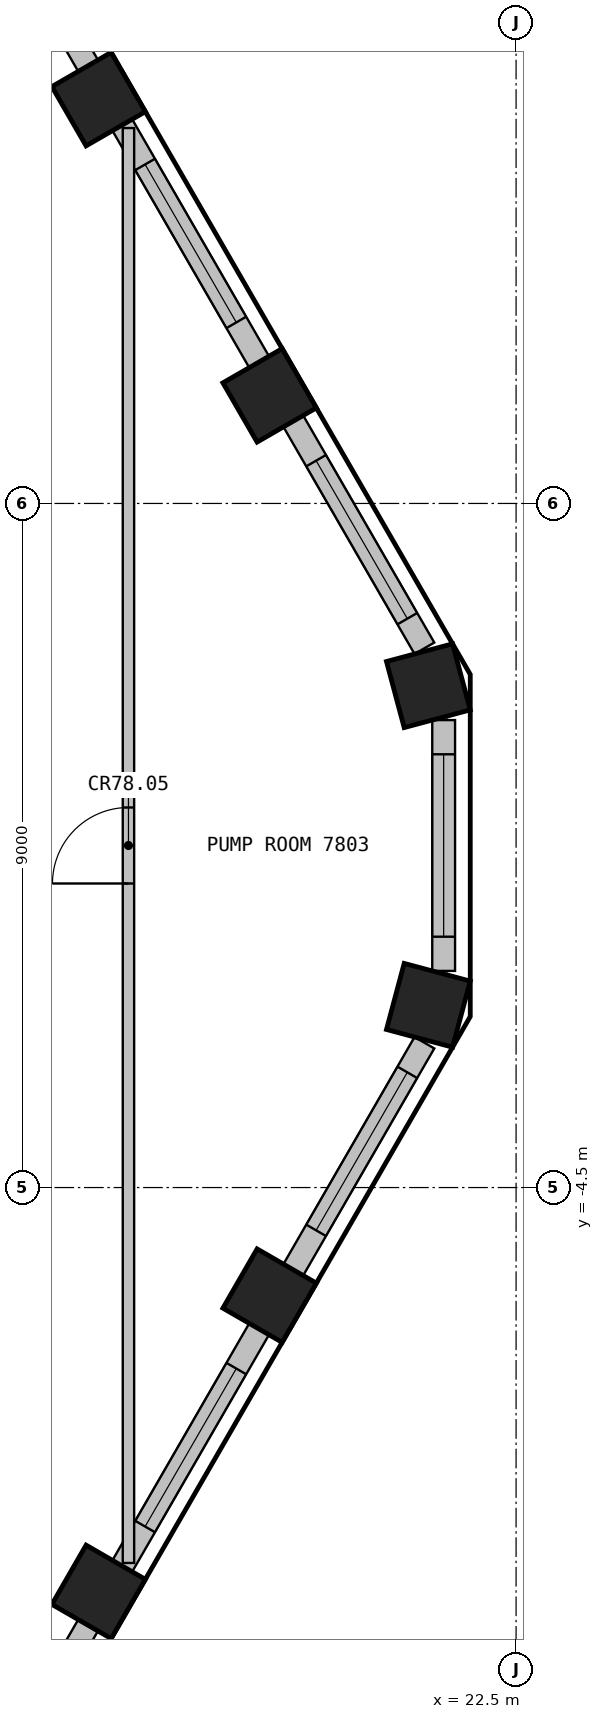
"""IFC4 building model, lengths in metres.
Left out: names, types, materials, properties, quantities, classifications, styles, units other than length and angle.
Written with IfcOpenShell. Run it as: python <this file> out.ifc"""

import sys

from ifc_helpers import new_model, si_unit, direction, frame, frame_2d, origin, origin_2d, place, context, subcontext, project, spatial, rectangle, extrude, element, fill, save


model = new_model("IFC4")
c1 = context("Model", 3, precision=1e-05, world=origin(), true_north=direction((0.0, 1.0)))
c2 = subcontext(c1, "Body", "Model", "MODEL_VIEW")
j1 = project(units=[si_unit("LENGTHUNIT", "METRE"), si_unit("PLANEANGLEUNIT", "RADIAN")], contexts=[c1])
p1 = place(None, origin())
s1 = spatial("IfcSite", under=j1, at=p1, CompositionType="ELEMENT")
p2 = place(p1, origin())
s2 = spatial("IfcBuilding", under=s1, at=p2, CompositionType="ELEMENT")
p3 = place(p2, frame((0.0, 0.0, 318.9)))
s3 = spatial("IfcBuildingStorey", under=s2, at=p3, CompositionType="ELEMENT", Elevation=318.9)
for number, where, z_axis, x_axis in (
    (1, (17.007, -9.819, 0.0), (0.0, 0.0, 1.0), (0.5, 0.866, 0.0)),
    (2, (19.257, -5.922, 0.0), (0.0, 0.0, 1.0), (0.5, 0.866, 0.0)),
    (3, (21.346, -2.102, 0.0), (0.0, 0.0, 1.0), (0.259, 0.966, 0.0)),
    (4, (21.346, 2.102, 0.0), (0.0, 0.0, 1.0), (-0.259, 0.966, 0.0)),
    (5, (19.257, 5.922, 0.0), (0.0, 0.0, 1.0), (-0.5, 0.866, 0.0)),
    (6, (17.007, 9.819, 0.0), (0.0, 0.0, 1.0), (-0.5, 0.866, 0.0)),
):
    element("IfcColumn", number, at=place(p3, frame(where, z_axis=z_axis, x_axis=x_axis)), inside=s3, PredefinedType="COLUMN", context=c2, shape_type="SweptSolid", body=[
        extrude(rectangle(XDim=0.9, YDim=0.9, at=origin_2d()), origin(), (0.0, 0.0, 1.0), 3.6),
    ])
p4 = place(p3, frame((15.144, -13.247, 0.0), z_axis=(0.0, 0.0, 1.0), x_axis=(0.500059425018, 0.865991092016, 0.0)))
e7 = element("IfcWall", 7, at=p4, inside=s3, PredefinedType="SOLIDWALL", context=c2, shape_type="SweptSolid", body=[
    extrude(rectangle(XDim=3.449, YDim=0.3, at=frame_2d((1.725, 0.0))), origin(), (0.0, 0.0, 1.0), 4.05),
])
p5 = place(p4, frame((0.45, 0.0, 0.6)))
e8 = element("IfcOpeningElement", 8, at=p5, cuts=e7, PredefinedType="OPENING", context=c2, shape_type="SweptSolid", body=[
    extrude(rectangle(XDim=2.4, YDim=2.3, at=frame_2d((1.2, 1.15))), frame((0.0, 0.16, 0.0), z_axis=(0.0, -1.0, 0.0), x_axis=(1.0, 0.0, 0.0)), (0.0, 0.0, 1.0), 0.32),
])
p6 = place(p3, frame((17.319, -9.479, 0.0), z_axis=(0.0, 0.0, 1.0), x_axis=(0.500027802648, 0.866009351323, 0.0)))
e9 = element("IfcWall", 9, at=p6, inside=s3, PredefinedType="SOLIDWALL", context=c2, shape_type="SweptSolid", body=[
    extrude(rectangle(XDim=3.599, YDim=0.3, at=frame_2d((1.799, 0.0))), origin(), (0.0, 0.0, 1.0), 4.05),
])
p7 = place(p6, frame((0.6, 0.0, 0.6)))
e10 = element("IfcOpeningElement", 10, at=p7, cuts=e9, PredefinedType="OPENING", context=c2, shape_type="SweptSolid", body=[
    extrude(rectangle(XDim=2.4, YDim=2.3, at=frame_2d((1.2, 1.15))), frame((0.0, 0.16, 0.0), z_axis=(0.0, -1.0, 0.0), x_axis=(1.0, 0.0, 0.0)), (0.0, 0.0, 1.0), 0.32),
])
p8 = place(p3, frame((19.569, -5.582, 0.0), z_axis=(0.0, 0.0, 1.0), x_axis=(0.499975693202, 0.866039436866, 0.0)))
e11 = element("IfcWall", 11, at=p8, inside=s3, PredefinedType="SOLIDWALL", context=c2, shape_type="SweptSolid", body=[
    extrude(rectangle(XDim=3.449, YDim=0.3, at=frame_2d((1.725, 0.0))), origin(), (0.0, 0.0, 1.0), 4.05),
])
p9 = place(p8, frame((0.6, 0.0, 0.6)))
e12 = element("IfcOpeningElement", 12, at=p9, cuts=e11, PredefinedType="OPENING", context=c2, shape_type="SweptSolid", body=[
    extrude(rectangle(XDim=2.4, YDim=2.3, at=frame_2d((1.2, 1.15))), frame((0.0, 0.16, 0.0), z_axis=(0.0, -1.0, 0.0), x_axis=(1.0, 0.0, 0.0)), (0.0, 0.0, 1.0), 0.32),
])
p10 = place(p3, frame((21.547, -1.65, 0.0), z_axis=(0.0, 0.0, 1.0), x_axis=(0.0, 1.0, 0.0)))
e13 = element("IfcWall", 13, at=p10, inside=s3, PredefinedType="SOLIDWALL", context=c2, shape_type="SweptSolid", body=[
    extrude(rectangle(XDim=3.3, YDim=0.3, at=frame_2d((1.65, 0.0))), origin(), (0.0, 0.0, 1.0), 4.05),
])
p11 = place(p10, frame((0.45, 0.0, 0.6)))
e14 = element("IfcOpeningElement", 14, at=p11, cuts=e13, PredefinedType="OPENING", context=c2, shape_type="SweptSolid", body=[
    extrude(rectangle(XDim=2.4, YDim=2.3, at=frame_2d((1.2, 1.15))), frame((0.0, 0.16, 0.0), z_axis=(0.0, -1.0, 0.0), x_axis=(1.0, 0.0, 0.0)), (0.0, 0.0, 1.0), 0.32),
])
p12 = place(p3, frame((21.294, 2.595, 0.0), z_axis=(0.0, 0.0, 1.0), x_axis=(-0.499975693202, 0.866039436866, 0.0)))
e15 = element("IfcWall", 15, at=p12, inside=s3, PredefinedType="SOLIDWALL", context=c2, shape_type="SweptSolid", body=[
    extrude(rectangle(XDim=3.449, YDim=0.3, at=frame_2d((1.725, 0.0))), origin(), (0.0, 0.0, 1.0), 4.05),
])
p13 = place(p12, frame((0.45, 0.0, 0.6)))
e16 = element("IfcOpeningElement", 16, at=p13, cuts=e15, PredefinedType="OPENING", context=c2, shape_type="SweptSolid", body=[
    extrude(rectangle(XDim=2.4, YDim=2.3, at=frame_2d((1.2, 1.15))), frame((0.0, 0.16, 0.0), z_axis=(0.0, -1.0, 0.0), x_axis=(1.0, 0.0, 0.0)), (0.0, 0.0, 1.0), 0.32),
])
p14 = place(p3, frame((19.119, 6.362, 0.0), z_axis=(0.0, 0.0, 1.0), x_axis=(-0.500027802648, 0.866009351323, 0.0)))
e17 = element("IfcWall", 17, at=p14, inside=s3, PredefinedType="SOLIDWALL", context=c2, shape_type="SweptSolid", body=[
    extrude(rectangle(XDim=3.599, YDim=0.3, at=frame_2d((1.799, 0.0))), origin(), (0.0, 0.0, 1.0), 4.05),
])
p15 = place(p14, frame((0.6, 0.0, 0.6)))
e18 = element("IfcOpeningElement", 18, at=p15, cuts=e17, PredefinedType="OPENING", context=c2, shape_type="SweptSolid", body=[
    extrude(rectangle(XDim=2.4, YDim=2.3, at=frame_2d((1.2, 1.15))), frame((0.0, 0.16, 0.0), z_axis=(0.0, -1.0, 0.0), x_axis=(1.0, 0.0, 0.0)), (0.0, 0.0, 1.0), 0.32),
])
p16 = place(p3, frame((16.869, 10.26, 0.0), z_axis=(0.0, 0.0, 1.0), x_axis=(-0.500059425018, 0.865991092016, 0.0)))
e19 = element("IfcWall", 19, at=p16, inside=s3, PredefinedType="SOLIDWALL", context=c2, shape_type="SweptSolid", body=[
    extrude(rectangle(XDim=3.449, YDim=0.3, at=frame_2d((1.725, 0.0))), origin(), (0.0, 0.0, 1.0), 4.05),
])
p17 = place(p16, frame((0.6, 0.0, 0.6)))
e20 = element("IfcOpeningElement", 20, at=p17, cuts=e19, PredefinedType="OPENING", context=c2, shape_type="SweptSolid", body=[
    extrude(rectangle(XDim=2.4, YDim=2.3, at=frame_2d((1.2, 1.15))), frame((0.0, 0.16, 0.0), z_axis=(0.0, -1.0, 0.0), x_axis=(1.0, 0.0, 0.0)), (0.0, 0.0, 1.0), 0.32),
])
p18 = place(p3, frame((17.4, -9.439, 0.0), z_axis=(0.0, 0.0, 1.0), x_axis=(0.0, 1.0, 0.0)))
e21 = element("IfcWall", 21, at=p18, inside=s3, PredefinedType="PARTITIONING", context=c2, shape_type="SweptSolid", body=[
    extrude(rectangle(XDim=18.878, YDim=0.15, at=frame_2d((9.439, 0.0))), origin(), (0.0, 0.0, 1.0), 3.6),
])
p19 = place(p18, frame((8.939, 0.0, 0.0)))
e22 = element("IfcOpeningElement", 22, at=p19, cuts=e21, PredefinedType="OPENING", context=c2, shape_type="SweptSolid", body=[
    extrude(rectangle(XDim=1.0, YDim=2.1, at=frame_2d((0.5, 1.05))), frame((0.0, 0.085, 0.0), z_axis=(0.0, -1.0, 0.0), x_axis=(1.0, 0.0, 0.0)), (0.0, 0.0, 1.0), 0.17),
])
p20 = place(p7, origin())
e23 = element("IfcWindow", 23, at=p20, inside=s3, PartitioningType="SINGLE_PANEL", PredefinedType="WINDOW", context=c2, shape_type="SweptSolid", body=[
    extrude(rectangle(XDim=2.4, YDim=2.3, at=frame_2d((1.2, 1.15))), frame((0.0, 0.03, 0.0), z_axis=(0.0, -1.0, 0.0), x_axis=(1.0, 0.0, 0.0)), (0.0, 0.0, 1.0), 0.06),
])
fill(e10, e23)
p21 = place(p9, origin())
e24 = element("IfcWindow", 24, at=p21, inside=s3, PartitioningType="SINGLE_PANEL", PredefinedType="WINDOW", context=c2, shape_type="SweptSolid", body=[
    extrude(rectangle(XDim=2.4, YDim=2.3, at=frame_2d((1.2, 1.15))), frame((0.0, 0.03, 0.0), z_axis=(0.0, -1.0, 0.0), x_axis=(1.0, 0.0, 0.0)), (0.0, 0.0, 1.0), 0.06),
])
fill(e12, e24)
p22 = place(p11, origin())
e25 = element("IfcWindow", 25, at=p22, inside=s3, PartitioningType="SINGLE_PANEL", PredefinedType="WINDOW", context=c2, shape_type="SweptSolid", body=[
    extrude(rectangle(XDim=2.4, YDim=2.3, at=frame_2d((1.2, 1.15))), frame((0.0, 0.03, 0.0), z_axis=(0.0, -1.0, 0.0), x_axis=(1.0, 0.0, 0.0)), (0.0, 0.0, 1.0), 0.06),
])
fill(e14, e25)
p23 = place(p13, origin())
e26 = element("IfcWindow", 26, at=p23, inside=s3, PartitioningType="SINGLE_PANEL", PredefinedType="WINDOW", context=c2, shape_type="SweptSolid", body=[
    extrude(rectangle(XDim=2.4, YDim=2.3, at=frame_2d((1.2, 1.15))), frame((0.0, 0.03, 0.0), z_axis=(0.0, -1.0, 0.0), x_axis=(1.0, 0.0, 0.0)), (0.0, 0.0, 1.0), 0.06),
])
fill(e16, e26)
p24 = place(p15, origin())
e27 = element("IfcWindow", 27, at=p24, inside=s3, PartitioningType="SINGLE_PANEL", PredefinedType="WINDOW", context=c2, shape_type="SweptSolid", body=[
    extrude(rectangle(XDim=2.4, YDim=2.3, at=frame_2d((1.2, 1.15))), frame((0.0, 0.03, 0.0), z_axis=(0.0, -1.0, 0.0), x_axis=(1.0, 0.0, 0.0)), (0.0, 0.0, 1.0), 0.06),
])
fill(e18, e27)
p25 = place(p19, origin())
e28 = element("IfcDoor", 28, at=p25, inside=s3, OperationType="SINGLE_SWING_LEFT", PredefinedType="DOOR", context=c2, shape_type="SweptSolid", body=[
    extrude(rectangle(XDim=1.0, YDim=2.1, at=frame_2d((0.5, 1.05))), frame((0.0, 0.025, 0.0), z_axis=(0.0, -1.0, 0.0), x_axis=(1.0, 0.0, 0.0)), (0.0, 0.0, 1.0), 0.05),
])
fill(e22, e28)
save(model, sys.argv[1])
